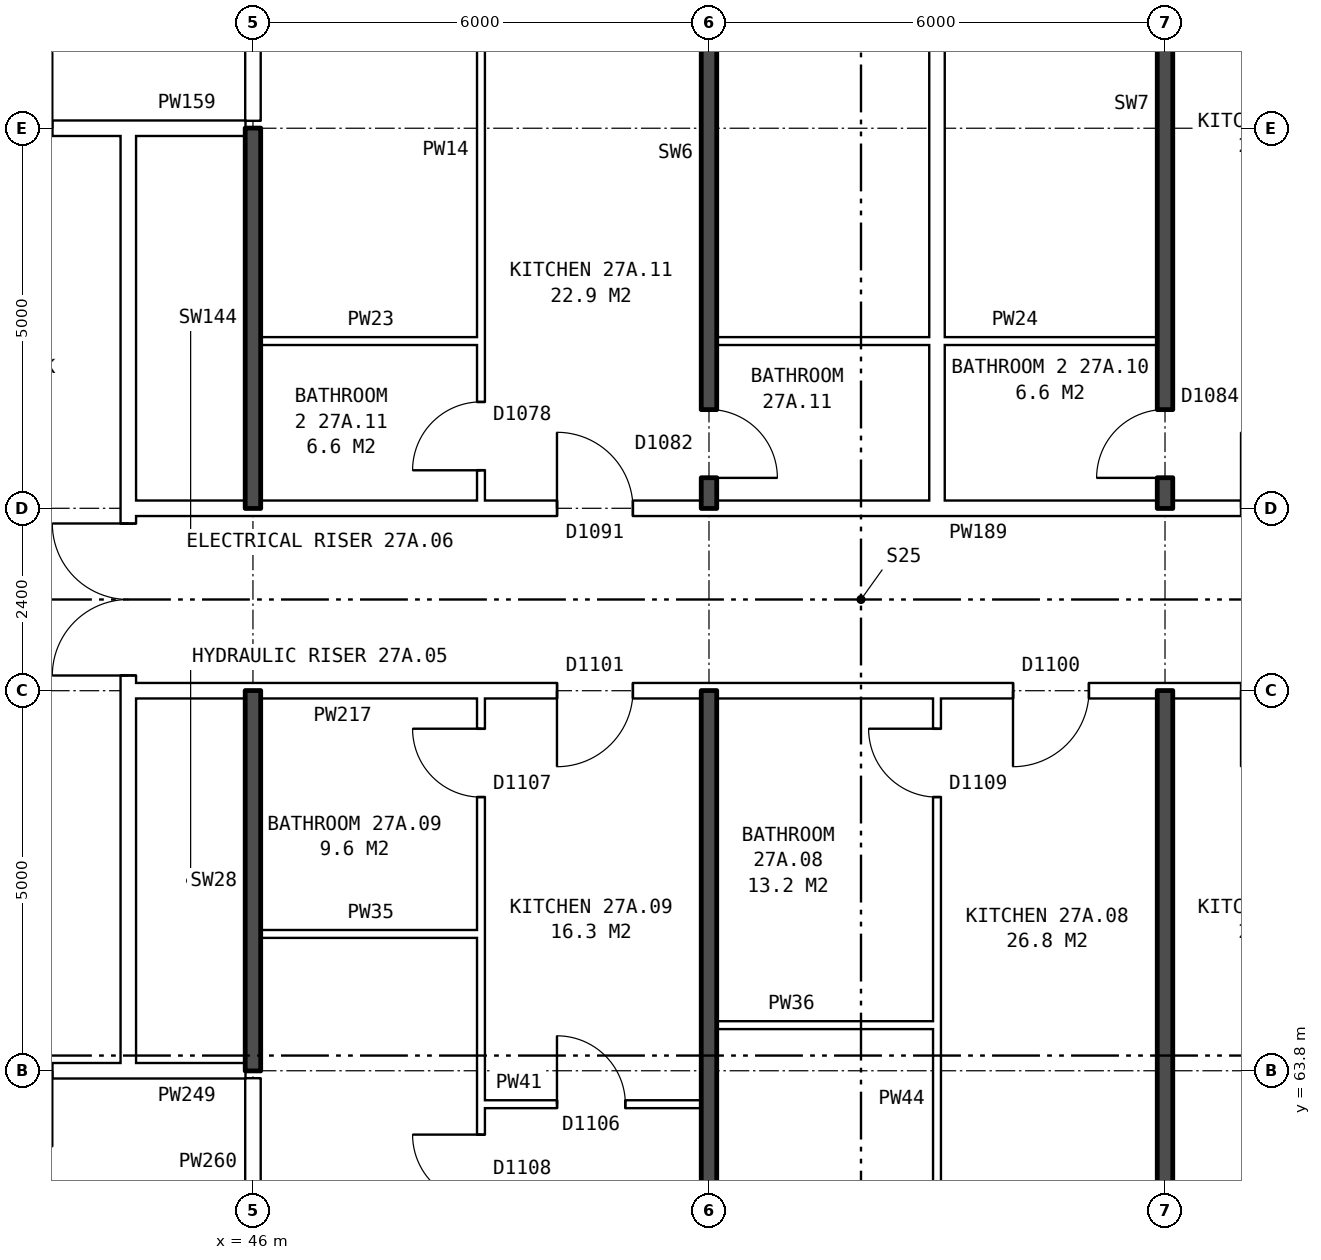
"""IFC4 building model, lengths in metres.
Left out: names, types, materials, properties, quantities, classifications, styles, units other than length and angle.
Written with IfcOpenShell. Run it as: python <this file> out.ifc"""

import sys

from ifc_helpers import new_model, si_unit, direction, frame, frame_2d, origin, place, context, subcontext, project, spatial, rectangle, extrude, element, fill, save


model = new_model("IFC4")
c1 = context("Model", 3, precision=1e-05, world=origin(), true_north=direction((0.0, 1.0)))
c2 = subcontext(c1, "Body", "Model", "MODEL_VIEW")
j1 = project(units=[si_unit("LENGTHUNIT", "METRE"), si_unit("PLANEANGLEUNIT", "RADIAN")], contexts=[c1])
p1 = place(None, origin())
s1 = spatial("IfcSite", under=j1, at=p1, CompositionType="ELEMENT")
p2 = place(p1, origin())
s2 = spatial("IfcBuilding", under=s1, at=p2, CompositionType="ELEMENT")
p3 = place(p2, frame((0.0, 0.0, 99.5)))
s3 = spatial("IfcBuildingStorey", under=s2, at=p3, CompositionType="ELEMENT", Elevation=99.5)
p4 = place(p3, frame((44.36, 63.9, 0.0), z_axis=(0.0, 0.0, 1.0), x_axis=(0.0, 1.0, 0.0)))
e1 = element("IfcWall", 1, at=p4, inside=s3, PredefinedType="PARTITIONING", context=c2, shape_type="SweptSolid", body=[
    extrude(rectangle(XDim=12.2, YDim=0.2, at=frame_2d((6.1, 0.0))), origin(), (0.0, 0.0, 1.0), 2.85),
])
p5 = place(p4, frame((5.1, 0.0, 0.0)))
e2 = element("IfcOpeningElement", 2, at=p5, cuts=e1, PredefinedType="OPENING", context=c2, shape_type="SweptSolid", body=[
    extrude(rectangle(XDim=2.0, YDim=2.1, at=frame_2d((1.0, 1.05))), frame((0.0, 0.11, 0.0), z_axis=(0.0, -1.0, 0.0), x_axis=(1.0, 0.0, 0.0)), (0.0, 0.0, 1.0), 0.22),
])
p6 = place(p3, frame((49.0, 63.36, 0.0), z_axis=(0.0, 0.0, 1.0), x_axis=(1.0, 0.0, 0.0)))
e3 = element("IfcWall", 3, at=p6, inside=s3, PredefinedType="PARTITIONING", context=c2, shape_type="SweptSolid", body=[
    extrude(rectangle(XDim=2.9, YDim=0.1, at=frame_2d((1.45, 0.0))), origin(), (0.0, 0.0, 1.0), 2.85),
])
p7 = place(p6, frame((1.0, 0.0, 0.0)))
e4 = element("IfcOpeningElement", 4, at=p7, cuts=e3, PredefinedType="OPENING", context=c2, shape_type="SweptSolid", body=[
    extrude(rectangle(XDim=0.9, YDim=2.1, at=frame_2d((0.45, 1.05))), frame((0.0, 0.06, 0.0), z_axis=(0.0, -1.0, 0.0), x_axis=(1.0, 0.0, 0.0)), (0.0, 0.0, 1.0), 0.12),
])
p8 = place(p3, frame((41.36, 63.8, 0.0), z_axis=(0.0, 0.0, 1.0), x_axis=(1.0, 0.0, 0.0)))
e5 = element("IfcWall", 5, at=p8, inside=s3, PredefinedType="PARTITIONING", context=c2, shape_type="SweptSolid", body=[
    extrude(rectangle(XDim=3.0, YDim=0.2, at=frame_2d((1.5, 0.0))), origin(), (0.0, 0.0, 1.0), 2.85),
])
p9 = place(p8, frame((1.0, 0.0, 0.0)))
e6 = element("IfcOpeningElement", 6, at=p9, cuts=e5, PredefinedType="OPENING", context=c2, shape_type="SweptSolid", body=[
    extrude(rectangle(XDim=1.0, YDim=2.1, at=frame_2d((0.5, 1.05))), frame((0.0, 0.11, 0.0), z_axis=(0.0, -1.0, 0.0), x_axis=(1.0, 0.0, 0.0)), (0.0, 0.0, 1.0), 0.22),
])
p10 = place(p3, frame((44.36, 63.8, 0.0), z_axis=(0.0, 0.0, 1.0), x_axis=(1.0, 0.0, 0.0)))
e7 = element("IfcWall", 7, at=p10, inside=s3, PredefinedType="PARTITIONING", context=c2, shape_type="SweptSolid", body=[
    extrude(rectangle(XDim=1.54, YDim=0.2, at=frame_2d((0.77, 0.0))), origin(), (0.0, 0.0, 1.0), 2.85),
])
for number, where, z_axis, x_axis in (
    (8, (52.1, 64.4, 0.0), (0.0, 0.0, 1.0), (1.0, 0.0, 0.0)),
    (9, (46.1, 65.6, 0.0), (0.0, 0.0, 1.0), (1.0, 0.0, 0.0)),
):
    element("IfcWall", number, at=place(p3, frame(where, z_axis=z_axis, x_axis=x_axis)), inside=s3, PredefinedType="PARTITIONING", context=c2, shape_type="SweptSolid", body=[
        extrude(rectangle(XDim=2.9, YDim=0.1, at=frame_2d((1.45, 0.0))), origin(), (0.0, 0.0, 1.0), 2.85),
    ])
p11 = place(p3, frame((44.36, 68.8, 0.0), z_axis=(0.0, 0.0, 1.0), x_axis=(1.0, 0.0, 0.0)))
e10 = element("IfcWall", 10, at=p11, inside=s3, PredefinedType="PARTITIONING", context=c2, shape_type="SweptSolid", body=[
    extrude(rectangle(XDim=19.28, YDim=0.2, at=frame_2d((9.64, 0.0))), origin(), (0.0, 0.0, 1.0), 2.85),
])
p12 = place(p11, frame((14.64, 0.0, 0.0)))
e11 = element("IfcOpeningElement", 11, at=p12, cuts=e10, PredefinedType="OPENING", context=c2, shape_type="SweptSolid", body=[
    extrude(rectangle(XDim=1.0, YDim=2.1, at=frame_2d((0.5, 1.05))), frame((0.0, 0.11, 0.0), z_axis=(0.0, -1.0, 0.0), x_axis=(1.0, 0.0, 0.0)), (0.0, 0.0, 1.0), 0.22),
])
p13 = place(p11, frame((11.64, 0.0, 0.0)))
e12 = element("IfcOpeningElement", 12, at=p13, cuts=e10, PredefinedType="OPENING", context=c2, shape_type="SweptSolid", body=[
    extrude(rectangle(XDim=1.0, YDim=2.1, at=frame_2d((0.5, 1.05))), frame((0.0, 0.11, 0.0), z_axis=(0.0, -1.0, 0.0), x_axis=(1.0, 0.0, 0.0)), (0.0, 0.0, 1.0), 0.22),
])
p14 = place(p11, frame((5.64, 0.0, 0.0)))
e13 = element("IfcOpeningElement", 13, at=p14, cuts=e10, PredefinedType="OPENING", context=c2, shape_type="SweptSolid", body=[
    extrude(rectangle(XDim=1.0, YDim=2.1, at=frame_2d((0.5, 1.05))), frame((0.0, 0.11, 0.0), z_axis=(0.0, -1.0, 0.0), x_axis=(1.0, 0.0, 0.0)), (0.0, 0.0, 1.0), 0.22),
])
p15 = place(p3, frame((44.36, 71.2, 0.0), z_axis=(0.0, 0.0, 1.0), x_axis=(1.0, 0.0, 0.0)))
e14 = element("IfcWall", 14, at=p15, inside=s3, PredefinedType="PARTITIONING", context=c2, shape_type="SweptSolid", body=[
    extrude(rectangle(XDim=19.28, YDim=0.2, at=frame_2d((9.64, 0.0))), origin(), (0.0, 0.0, 1.0), 2.85),
])
p16 = place(p15, frame((14.64, 0.0, 0.0)))
e15 = element("IfcOpeningElement", 15, at=p16, cuts=e14, PredefinedType="OPENING", context=c2, shape_type="SweptSolid", body=[
    extrude(rectangle(XDim=1.0, YDim=2.1, at=frame_2d((0.5, 1.05))), frame((0.0, 0.11, 0.0), z_axis=(0.0, -1.0, 0.0), x_axis=(1.0, 0.0, 0.0)), (0.0, 0.0, 1.0), 0.22),
])
p17 = place(p15, frame((5.64, 0.0, 0.0)))
e16 = element("IfcOpeningElement", 16, at=p17, cuts=e14, PredefinedType="OPENING", context=c2, shape_type="SweptSolid", body=[
    extrude(rectangle(XDim=1.0, YDim=2.1, at=frame_2d((0.5, 1.05))), frame((0.0, 0.11, 0.0), z_axis=(0.0, -1.0, 0.0), x_axis=(1.0, 0.0, 0.0)), (0.0, 0.0, 1.0), 0.22),
])
p18 = place(p3, frame((46.1, 73.4, 0.0), z_axis=(0.0, 0.0, 1.0), x_axis=(1.0, 0.0, 0.0)))
e17 = element("IfcWall", 17, at=p18, inside=s3, PredefinedType="PARTITIONING", context=c2, shape_type="SweptSolid", body=[
    extrude(rectangle(XDim=2.9, YDim=0.1, at=frame_2d((1.45, 0.0))), origin(), (0.0, 0.0, 1.0), 2.85),
])
p19 = place(p3, frame((52.1, 73.4, 0.0), z_axis=(0.0, 0.0, 1.0), x_axis=(1.0, 0.0, 0.0)))
e18 = element("IfcWall", 18, at=p19, inside=s3, PredefinedType="PARTITIONING", context=c2, shape_type="SweptSolid", body=[
    extrude(rectangle(XDim=5.8, YDim=0.1, at=frame_2d((2.9, 0.0))), origin(), (0.0, 0.0, 1.0), 2.85),
])
p20 = place(p3, frame((41.36, 76.2, 0.0), z_axis=(0.0, 0.0, 1.0), x_axis=(1.0, 0.0, 0.0)))
e19 = element("IfcWall", 19, at=p20, inside=s3, PredefinedType="PARTITIONING", context=c2, shape_type="SweptSolid", body=[
    extrude(rectangle(XDim=3.0, YDim=0.2, at=frame_2d((1.5, 0.0))), origin(), (0.0, 0.0, 1.0), 2.85),
])
p21 = place(p20, frame((1.0, 0.0, 0.0)))
e20 = element("IfcOpeningElement", 20, at=p21, cuts=e19, PredefinedType="OPENING", context=c2, shape_type="SweptSolid", body=[
    extrude(rectangle(XDim=1.0, YDim=2.1, at=frame_2d((0.5, 1.05))), frame((0.0, 0.11, 0.0), z_axis=(0.0, -1.0, 0.0), x_axis=(1.0, 0.0, 0.0)), (0.0, 0.0, 1.0), 0.22),
])
p22 = place(p3, frame((44.36, 76.2, 0.0), z_axis=(0.0, 0.0, 1.0), x_axis=(1.0, 0.0, 0.0)))
e21 = element("IfcWall", 21, at=p22, inside=s3, PredefinedType="PARTITIONING", context=c2, shape_type="SweptSolid", body=[
    extrude(rectangle(XDim=1.54, YDim=0.2, at=frame_2d((0.77, 0.0))), origin(), (0.0, 0.0, 1.0), 2.85),
])
p23 = place(p3, frame((46.0, 61.5, 0.0), z_axis=(0.0, 0.0, 1.0), x_axis=(0.0, 1.0, 0.0)))
e22 = element("IfcWall", 22, at=p23, inside=s3, PredefinedType="PARTITIONING", context=c2, shape_type="SweptSolid", body=[
    extrude(rectangle(XDim=2.2, YDim=0.2, at=frame_2d((1.1, 0.0))), origin(), (0.0, 0.0, 1.0), 2.85),
])
for number, where, z_axis, x_axis in (
    (23, (46.0, 63.8, 0.0), (0.0, 0.0, 1.0), (0.0, 1.0, 0.0)),
    (24, (46.0, 71.2, 0.0), (0.0, 0.0, 1.0), (0.0, 1.0, 0.0)),
):
    element("IfcWall", number, at=place(p3, frame(where, z_axis=z_axis, x_axis=x_axis)), inside=s3, PredefinedType="SOLIDWALL", context=c2, shape_type="SweptSolid", body=[
        extrude(rectangle(XDim=5.0, YDim=0.2, at=frame_2d((2.5, 0.0))), origin(), (0.0, 0.0, 1.0), 2.85),
    ])
p24 = place(p3, frame((46.0, 76.3, 0.0), z_axis=(0.0, 0.0, 1.0), x_axis=(0.0, 1.0, 0.0)))
e25 = element("IfcWall", 25, at=p24, inside=s3, PredefinedType="PARTITIONING", context=c2, shape_type="SweptSolid", body=[
    extrude(rectangle(XDim=2.2, YDim=0.2, at=frame_2d((1.1, 0.0))), origin(), (0.0, 0.0, 1.0), 2.85),
])
p25 = place(p3, frame((49.0, 54.36, 0.0), z_axis=(0.0, 0.0, 1.0), x_axis=(0.0, 1.0, 0.0)))
e26 = element("IfcWall", 26, at=p25, inside=s3, PredefinedType="PARTITIONING", context=c2, shape_type="SweptSolid", body=[
    extrude(rectangle(XDim=14.34, YDim=0.1, at=frame_2d((7.17, 0.0))), origin(), (0.0, 0.0, 1.0), 2.85),
])
p26 = place(p25, frame((7.7, 0.0, 0.0)))
e27 = element("IfcOpeningElement", 27, at=p26, cuts=e26, PredefinedType="OPENING", context=c2, shape_type="SweptSolid", body=[
    extrude(rectangle(XDim=0.9, YDim=2.1, at=frame_2d((0.45, 1.05))), frame((0.0, 0.06, 0.0), z_axis=(0.0, -1.0, 0.0), x_axis=(1.0, 0.0, 0.0)), (0.0, 0.0, 1.0), 0.12),
])
p27 = place(p25, frame((13.04, 0.0, 0.0)))
e28 = element("IfcOpeningElement", 28, at=p27, cuts=e26, PredefinedType="OPENING", context=c2, shape_type="SweptSolid", body=[
    extrude(rectangle(XDim=0.9, YDim=2.1, at=frame_2d((0.45, 1.05))), frame((0.0, 0.06, 0.0), z_axis=(0.0, -1.0, 0.0), x_axis=(1.0, 0.0, 0.0)), (0.0, 0.0, 1.0), 0.12),
])
p28 = place(p3, frame((49.0, 71.3, 0.0), z_axis=(0.0, 0.0, 1.0), x_axis=(0.0, 1.0, 0.0)))
e29 = element("IfcWall", 29, at=p28, inside=s3, PredefinedType="PARTITIONING", context=c2, shape_type="SweptSolid", body=[
    extrude(rectangle(XDim=14.34, YDim=0.1, at=frame_2d((7.17, 0.0))), origin(), (0.0, 0.0, 1.0), 2.85),
])
p29 = place(p28, frame((7.94, 0.0, 0.0)))
e30 = element("IfcOpeningElement", 30, at=p29, cuts=e29, PredefinedType="OPENING", context=c2, shape_type="SweptSolid", body=[
    extrude(rectangle(XDim=0.9, YDim=2.1, at=frame_2d((0.45, 1.05))), frame((0.0, 0.06, 0.0), z_axis=(0.0, -1.0, 0.0), x_axis=(1.0, 0.0, 0.0)), (0.0, 0.0, 1.0), 0.12),
])
p30 = place(p28, frame((0.4, 0.0, 0.0)))
e31 = element("IfcOpeningElement", 31, at=p30, cuts=e29, PredefinedType="OPENING", context=c2, shape_type="SweptSolid", body=[
    extrude(rectangle(XDim=0.9, YDim=2.1, at=frame_2d((0.45, 1.05))), frame((0.0, 0.06, 0.0), z_axis=(0.0, -1.0, 0.0), x_axis=(1.0, 0.0, 0.0)), (0.0, 0.0, 1.0), 0.12),
])
p31 = place(p3, frame((52.0, 54.36, 0.0), z_axis=(0.0, 0.0, 1.0), x_axis=(0.0, 1.0, 0.0)))
e32 = element("IfcWall", 32, at=p31, inside=s3, PredefinedType="SOLIDWALL", context=c2, shape_type="SweptSolid", body=[
    extrude(rectangle(XDim=14.44, YDim=0.2, at=frame_2d((7.22, 0.0))), origin(), (0.0, 0.0, 1.0), 2.85),
])
p32 = place(p3, frame((52.0, 71.2, 0.0), z_axis=(0.0, 0.0, 1.0), x_axis=(0.0, 1.0, 0.0)))
e33 = element("IfcWall", 33, at=p32, inside=s3, PredefinedType="SOLIDWALL", context=c2, shape_type="SweptSolid", body=[
    extrude(rectangle(XDim=14.44, YDim=0.2, at=frame_2d((7.22, 0.0))), origin(), (0.0, 0.0, 1.0), 2.85),
])
p33 = place(p32, frame((8.04, 0.0, 0.0)))
e34 = element("IfcOpeningElement", 34, at=p33, cuts=e33, PredefinedType="OPENING", context=c2, shape_type="SweptSolid", body=[
    extrude(rectangle(XDim=0.9, YDim=2.1, at=frame_2d((0.45, 1.05))), frame((0.0, 0.11, 0.0), z_axis=(0.0, -1.0, 0.0), x_axis=(1.0, 0.0, 0.0)), (0.0, 0.0, 1.0), 0.22),
])
p34 = place(p32, frame((0.4, 0.0, 0.0)))
e35 = element("IfcOpeningElement", 35, at=p34, cuts=e33, PredefinedType="OPENING", context=c2, shape_type="SweptSolid", body=[
    extrude(rectangle(XDim=0.9, YDim=2.1, at=frame_2d((0.45, 1.05))), frame((0.0, 0.11, 0.0), z_axis=(0.0, -1.0, 0.0), x_axis=(1.0, 0.0, 0.0)), (0.0, 0.0, 1.0), 0.22),
])
p35 = place(p3, frame((55.0, 54.36, 0.0), z_axis=(0.0, 0.0, 1.0), x_axis=(0.0, 1.0, 0.0)))
e36 = element("IfcWall", 36, at=p35, inside=s3, PredefinedType="PARTITIONING", context=c2, shape_type="SweptSolid", body=[
    extrude(rectangle(XDim=14.34, YDim=0.1, at=frame_2d((7.17, 0.0))), origin(), (0.0, 0.0, 1.0), 2.85),
])
p36 = place(p35, frame((4.2, 0.0, 0.0)))
e37 = element("IfcOpeningElement", 37, at=p36, cuts=e36, PredefinedType="OPENING", context=c2, shape_type="SweptSolid", body=[
    extrude(rectangle(XDim=0.9, YDim=2.1, at=frame_2d((0.45, 1.05))), frame((0.0, 0.06, 0.0), z_axis=(0.0, -1.0, 0.0), x_axis=(1.0, 0.0, 0.0)), (0.0, 0.0, 1.0), 0.12),
])
p37 = place(p35, frame((13.04, 0.0, 0.0)))
e38 = element("IfcOpeningElement", 38, at=p37, cuts=e36, PredefinedType="OPENING", context=c2, shape_type="SweptSolid", body=[
    extrude(rectangle(XDim=0.9, YDim=2.1, at=frame_2d((0.45, 1.05))), frame((0.0, 0.06, 0.0), z_axis=(0.0, -1.0, 0.0), x_axis=(1.0, 0.0, 0.0)), (0.0, 0.0, 1.0), 0.12),
])
p38 = place(p3, frame((55.0, 71.3, 0.0), z_axis=(0.0, 0.0, 1.0), x_axis=(0.0, 1.0, 0.0)))
e39 = element("IfcWall", 39, at=p38, inside=s3, PredefinedType="PARTITIONING", context=c2, shape_type="SweptSolid", body=[
    extrude(rectangle(XDim=14.34, YDim=0.2, at=frame_2d((7.17, 0.0))), origin(), (0.0, 0.0, 1.0), 2.85),
])
p39 = place(p3, frame((58.0, 54.36, 0.0), z_axis=(0.0, 0.0, 1.0), x_axis=(0.0, 1.0, 0.0)))
e40 = element("IfcWall", 40, at=p39, inside=s3, PredefinedType="SOLIDWALL", context=c2, shape_type="SweptSolid", body=[
    extrude(rectangle(XDim=14.44, YDim=0.2, at=frame_2d((7.22, 0.0))), origin(), (0.0, 0.0, 1.0), 2.85),
])
p40 = place(p3, frame((58.0, 71.2, 0.0), z_axis=(0.0, 0.0, 1.0), x_axis=(0.0, 1.0, 0.0)))
e41 = element("IfcWall", 41, at=p40, inside=s3, PredefinedType="SOLIDWALL", context=c2, shape_type="SweptSolid", body=[
    extrude(rectangle(XDim=14.44, YDim=0.2, at=frame_2d((7.22, 0.0))), origin(), (0.0, 0.0, 1.0), 2.85),
])
p41 = place(p40, frame((9.34, 0.0, 0.0)))
e42 = element("IfcOpeningElement", 42, at=p41, cuts=e41, PredefinedType="OPENING", context=c2, shape_type="SweptSolid", body=[
    extrude(rectangle(XDim=0.9, YDim=2.1, at=frame_2d((0.45, 1.05))), frame((0.0, 0.11, 0.0), z_axis=(0.0, -1.0, 0.0), x_axis=(1.0, 0.0, 0.0)), (0.0, 0.0, 1.0), 0.22),
])
p42 = place(p40, frame((0.4, 0.0, 0.0)))
e43 = element("IfcOpeningElement", 43, at=p42, cuts=e41, PredefinedType="OPENING", context=c2, shape_type="SweptSolid", body=[
    extrude(rectangle(XDim=0.9, YDim=2.1, at=frame_2d((0.45, 1.05))), frame((0.0, 0.11, 0.0), z_axis=(0.0, -1.0, 0.0), x_axis=(1.0, 0.0, 0.0)), (0.0, 0.0, 1.0), 0.22),
])
p43 = place(p5, origin())
e44 = element("IfcDoor", 44, at=p43, inside=s3, OperationType="DOUBLE_DOOR_SINGLE_SWING", PredefinedType="DOOR", context=c2, shape_type="SweptSolid", body=[
    extrude(rectangle(XDim=2.0, YDim=2.1, at=frame_2d((1.0, 1.05))), frame((0.0, 0.025, 0.0), z_axis=(0.0, -1.0, 0.0), x_axis=(1.0, 0.0, 0.0)), (0.0, 0.0, 1.0), 0.05),
])
fill(e2, e44)
p44 = place(p13, frame((1.0, 0.0, 0.0), z_axis=(0.0, 0.0, 1.0), x_axis=(-1.0, 0.0, 0.0)))
e45 = element("IfcDoor", 45, at=p44, inside=s3, OperationType="SINGLE_SWING_RIGHT", PredefinedType="DOOR", context=c2, shape_type="SweptSolid", body=[
    extrude(rectangle(XDim=1.0, YDim=2.1, at=frame_2d((0.5, 1.05))), frame((0.0, 0.025, 0.0), z_axis=(0.0, -1.0, 0.0), x_axis=(1.0, 0.0, 0.0)), (0.0, 0.0, 1.0), 0.05),
])
fill(e12, e45)
p45 = place(p37, origin())
e46 = element("IfcDoor", 46, at=p45, inside=s3, OperationType="SINGLE_SWING_RIGHT", PredefinedType="DOOR", context=c2, shape_type="SweptSolid", body=[
    extrude(rectangle(XDim=0.9, YDim=2.1, at=frame_2d((0.45, 1.05))), frame((0.0, 0.025, 0.0), z_axis=(0.0, -1.0, 0.0), x_axis=(1.0, 0.0, 0.0)), (0.0, 0.0, 1.0), 0.05),
])
fill(e38, e46)
p46 = place(p26, origin())
e47 = element("IfcDoor", 47, at=p46, inside=s3, OperationType="SINGLE_SWING_RIGHT", PredefinedType="DOOR", context=c2, shape_type="SweptSolid", body=[
    extrude(rectangle(XDim=0.9, YDim=2.1, at=frame_2d((0.45, 1.05))), frame((0.0, 0.025, 0.0), z_axis=(0.0, -1.0, 0.0), x_axis=(1.0, 0.0, 0.0)), (0.0, 0.0, 1.0), 0.05),
])
fill(e27, e47)
p47 = place(p14, frame((1.0, 0.0, 0.0), z_axis=(0.0, 0.0, 1.0), x_axis=(-1.0, 0.0, 0.0)))
e48 = element("IfcDoor", 48, at=p47, inside=s3, OperationType="SINGLE_SWING_RIGHT", PredefinedType="DOOR", context=c2, shape_type="SweptSolid", body=[
    extrude(rectangle(XDim=1.0, YDim=2.1, at=frame_2d((0.5, 1.05))), frame((0.0, 0.025, 0.0), z_axis=(0.0, -1.0, 0.0), x_axis=(1.0, 0.0, 0.0)), (0.0, 0.0, 1.0), 0.05),
])
fill(e13, e48)
p48 = place(p7, origin())
e49 = element("IfcDoor", 49, at=p48, inside=s3, OperationType="SINGLE_SWING_LEFT", PredefinedType="DOOR", context=c2, shape_type="SweptSolid", body=[
    extrude(rectangle(XDim=0.9, YDim=2.1, at=frame_2d((0.45, 1.05))), frame((0.0, 0.025, 0.0), z_axis=(0.0, -1.0, 0.0), x_axis=(1.0, 0.0, 0.0)), (0.0, 0.0, 1.0), 0.05),
])
fill(e4, e49)
p49 = place(p27, origin())
e50 = element("IfcDoor", 50, at=p49, inside=s3, OperationType="SINGLE_SWING_RIGHT", PredefinedType="DOOR", context=c2, shape_type="SweptSolid", body=[
    extrude(rectangle(XDim=0.9, YDim=2.1, at=frame_2d((0.45, 1.05))), frame((0.0, 0.025, 0.0), z_axis=(0.0, -1.0, 0.0), x_axis=(1.0, 0.0, 0.0)), (0.0, 0.0, 1.0), 0.05),
])
fill(e28, e50)
p50 = place(p42, origin())
e51 = element("IfcDoor", 51, at=p50, inside=s3, OperationType="SINGLE_SWING_LEFT", PredefinedType="DOOR", context=c2, shape_type="SweptSolid", body=[
    extrude(rectangle(XDim=0.9, YDim=2.1, at=frame_2d((0.45, 1.05))), frame((0.0, 0.025, 0.0), z_axis=(0.0, -1.0, 0.0), x_axis=(1.0, 0.0, 0.0)), (0.0, 0.0, 1.0), 0.05),
])
fill(e43, e51)
p51 = place(p17, origin())
e52 = element("IfcDoor", 52, at=p51, inside=s3, OperationType="SINGLE_SWING_LEFT", PredefinedType="DOOR", context=c2, shape_type="SweptSolid", body=[
    extrude(rectangle(XDim=1.0, YDim=2.1, at=frame_2d((0.5, 1.05))), frame((0.0, 0.025, 0.0), z_axis=(0.0, -1.0, 0.0), x_axis=(1.0, 0.0, 0.0)), (0.0, 0.0, 1.0), 0.05),
])
fill(e16, e52)
p52 = place(p34, frame((0.9, 0.0, 0.0), z_axis=(0.0, 0.0, 1.0), x_axis=(-1.0, 0.0, 0.0)))
e53 = element("IfcDoor", 53, at=p52, inside=s3, OperationType="SINGLE_SWING_RIGHT", PredefinedType="DOOR", context=c2, shape_type="SweptSolid", body=[
    extrude(rectangle(XDim=0.9, YDim=2.1, at=frame_2d((0.45, 1.05))), frame((0.0, 0.025, 0.0), z_axis=(0.0, -1.0, 0.0), x_axis=(1.0, 0.0, 0.0)), (0.0, 0.0, 1.0), 0.05),
])
fill(e35, e53)
p53 = place(p30, origin())
e54 = element("IfcDoor", 54, at=p53, inside=s3, OperationType="SINGLE_SWING_LEFT", PredefinedType="DOOR", context=c2, shape_type="SweptSolid", body=[
    extrude(rectangle(XDim=0.9, YDim=2.1, at=frame_2d((0.45, 1.05))), frame((0.0, 0.025, 0.0), z_axis=(0.0, -1.0, 0.0), x_axis=(1.0, 0.0, 0.0)), (0.0, 0.0, 1.0), 0.05),
])
fill(e31, e54)
save(model, sys.argv[1])
